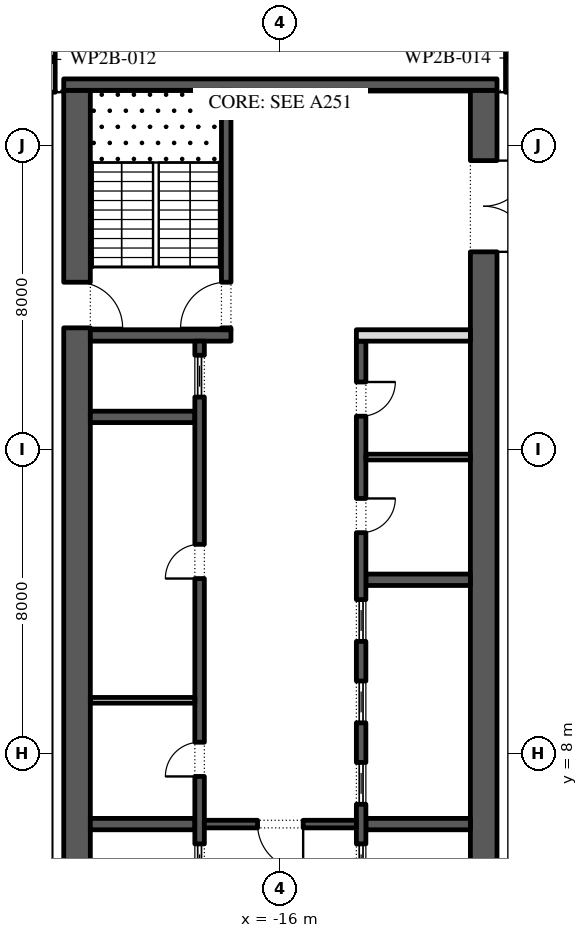
"""IFC4 building model, lengths in metres.
Left out: names, types, materials, properties, quantities, classifications, styles, units other than length and angle.
Written with IfcOpenShell. Run it as: python <this file> out.ifc"""

import sys

from ifc_helpers import new_model, si_unit, direction, frame, frame_2d, origin, place, context, subcontext, project, spatial, rectangle, extrude, element, fill, save


model = new_model("IFC4")
c1 = context("Model", 3, precision=1e-05, world=origin(), true_north=direction((0.0, 1.0)))
c2 = subcontext(c1, "Body", "Model", "MODEL_VIEW")
j1 = project(units=[si_unit("LENGTHUNIT", "METRE"), si_unit("PLANEANGLEUNIT", "RADIAN")], contexts=[c1])
p1 = place(None, origin())
s1 = spatial("IfcSite", under=j1, at=p1, CompositionType="ELEMENT")
p2 = place(p1, origin())
s2 = spatial("IfcBuilding", under=s1, at=p2, CompositionType="ELEMENT")
p3 = place(p2, frame((0.0, 0.0, 217.8)))
s3 = spatial("IfcBuildingStorey", under=s2, at=p3, CompositionType="ELEMENT", Elevation=217.8)
p4 = place(p3, frame((-33.157, 30.092, 0.0), z_axis=(0.0, 0.0, 1.0), x_axis=(0.224950279389, -0.974370243697, 0.0)))
e1 = element("IfcWall", 1, at=p4, inside=s3, PredefinedType="STANDARD", context=c2, shape_type="SweptSolid", body=[
    extrude(rectangle(XDim=49.5, YDim=0.3, at=frame_2d((24.75, 0.0))), origin(), (0.0, 0.0, 1.0), 3.95),
])
p5 = place(p4, frame((2.207, 0.0, 0.0)))
e2 = element("IfcOpeningElement", 2, at=p5, cuts=e1, PredefinedType="OPENING", context=c2, shape_type="SweptSolid", body=[
    extrude(rectangle(XDim=2.4, YDim=3.5, at=frame_2d((1.2, 1.75))), frame((0.0, 0.16, 0.0), z_axis=(0.0, -1.0, 0.0), x_axis=(1.0, 0.0, 0.0)), (0.0, 0.0, 1.0), 0.32),
])
p6 = place(p4, frame((8.121, 0.0, 0.45)))
e3 = element("IfcOpeningElement", 3, at=p6, cuts=e1, PredefinedType="OPENING", context=c2, shape_type="SweptSolid", body=[
    extrude(rectangle(XDim=4.5, YDim=2.775, at=frame_2d((2.25, 1.387))), frame((0.0, 0.16, 0.0), z_axis=(0.0, -1.0, 0.0), x_axis=(1.0, 0.0, 0.0)), (0.0, 0.0, 1.0), 0.32),
])
p7 = place(p4, frame((15.236, 0.0, 0.45)))
e4 = element("IfcOpeningElement", 4, at=p7, cuts=e1, PredefinedType="OPENING", context=c2, shape_type="SweptSolid", body=[
    extrude(rectangle(XDim=4.5, YDim=2.9, at=frame_2d((2.25, 1.45))), frame((0.0, 0.16, 0.0), z_axis=(0.0, -1.0, 0.0), x_axis=(1.0, 0.0, 0.0)), (0.0, 0.0, 1.0), 0.32),
])
p8 = place(p4, frame((22.35, 0.0, 0.45)))
e5 = element("IfcOpeningElement", 5, at=p8, cuts=e1, PredefinedType="OPENING", context=c2, shape_type="SweptSolid", body=[
    extrude(rectangle(XDim=4.5, YDim=2.95, at=frame_2d((2.25, 1.475))), frame((0.0, 0.16, 0.0), z_axis=(0.0, -1.0, 0.0), x_axis=(1.0, 0.0, 0.0)), (0.0, 0.0, 1.0), 0.32),
])
p9 = place(p4, frame((30.514, 0.0, 0.0)))
e6 = element("IfcOpeningElement", 6, at=p9, cuts=e1, PredefinedType="OPENING", context=c2, shape_type="SweptSolid", body=[
    extrude(rectangle(XDim=2.4, YDim=3.5, at=frame_2d((1.2, 1.75))), frame((0.0, 0.16, 0.0), z_axis=(0.0, -1.0, 0.0), x_axis=(1.0, 0.0, 0.0)), (0.0, 0.0, 1.0), 0.32),
])
p10 = place(p4, frame((36.579, 0.0, 0.45)))
e7 = element("IfcOpeningElement", 7, at=p10, cuts=e1, PredefinedType="OPENING", context=c2, shape_type="SweptSolid", body=[
    extrude(rectangle(XDim=4.5, YDim=3.05, at=frame_2d((2.25, 1.525))), frame((0.0, 0.16, 0.0), z_axis=(0.0, -1.0, 0.0), x_axis=(1.0, 0.0, 0.0)), (0.0, 0.0, 1.0), 0.32),
])
p11 = place(p4, frame((43.693, 0.0, 0.45)))
e8 = element("IfcOpeningElement", 8, at=p11, cuts=e1, PredefinedType="OPENING", context=c2, shape_type="SweptSolid", body=[
    extrude(rectangle(XDim=4.5, YDim=3.05, at=frame_2d((2.25, 1.525))), frame((0.0, 0.16, 0.0), z_axis=(0.0, -1.0, 0.0), x_axis=(1.0, 0.0, 0.0)), (0.0, 0.0, 1.0), 0.32),
])
p12 = place(p3, frame((-21.35, -2.45, 0.0), z_axis=(0.0, 0.0, 1.0), x_axis=(0.0, 1.0, 0.0)))
e9 = element("IfcWall", 9, at=p12, inside=s3, PredefinedType="SHEAR", context=c2, shape_type="SweptSolid", body=[
    extrude(rectangle(XDim=27.9, YDim=0.7, at=frame_2d((13.95, 0.0))), origin(), (0.0, 0.0, 1.0), 3.95),
])
p13 = place(p12, frame((5.05, 0.0, 0.0)))
e10 = element("IfcOpeningElement", 10, at=p13, cuts=e9, PredefinedType="OPENING", context=c2, shape_type="SweptSolid", body=[
    extrude(rectangle(XDim=1.2, YDim=2.1, at=frame_2d((0.6, 1.05))), frame((0.0, 0.36, 0.0), z_axis=(0.0, -1.0, 0.0), x_axis=(1.0, 0.0, 0.0)), (0.0, 0.0, 1.0), 0.72),
])
p14 = place(p12, frame((21.65, 0.0, 0.0)))
e11 = element("IfcOpeningElement", 11, at=p14, cuts=e9, PredefinedType="OPENING", context=c2, shape_type="SweptSolid", body=[
    extrude(rectangle(XDim=1.2, YDim=2.1, at=frame_2d((0.6, 1.05))), frame((0.0, 0.36, 0.0), z_axis=(0.0, -1.0, 0.0), x_axis=(1.0, 0.0, 0.0)), (0.0, 0.0, 1.0), 0.72),
])
p15 = place(p3, frame((-10.65, -2.45, 0.0), z_axis=(0.0, 0.0, 1.0), x_axis=(0.0, 1.0, 0.0)))
e12 = element("IfcWall", 12, at=p15, inside=s3, PredefinedType="SHEAR", context=c2, shape_type="SweptSolid", body=[
    extrude(rectangle(XDim=27.9, YDim=0.7, at=frame_2d((13.95, 0.0))), origin(), (0.0, 0.0, 1.0), 3.95),
])
p16 = place(p15, frame((23.65, 0.0, 0.0)))
e13 = element("IfcOpeningElement", 13, at=p16, cuts=e12, PredefinedType="OPENING", context=c2, shape_type="SweptSolid", body=[
    extrude(rectangle(XDim=2.4, YDim=2.1, at=frame_2d((1.2, 1.05))), frame((0.0, 0.36, 0.0), z_axis=(0.0, -1.0, 0.0), x_axis=(1.0, 0.0, 0.0)), (0.0, 0.0, 1.0), 0.72),
])
p17 = place(p15, frame((1.087, 0.0, 0.0)))
e14 = element("IfcOpeningElement", 14, at=p17, cuts=e12, PredefinedType="OPENING", context=c2, shape_type="SweptSolid", body=[
    extrude(rectangle(XDim=0.9, YDim=2.1, at=frame_2d((0.45, 1.05))), frame((0.0, 0.36, 0.0), z_axis=(0.0, -1.0, 0.0), x_axis=(1.0, 0.0, 0.0)), (0.0, 0.0, 1.0), 0.72),
])
p18 = place(p15, frame((4.262, 0.0, 0.0)))
e15 = element("IfcOpeningElement", 15, at=p18, cuts=e12, PredefinedType="OPENING", context=c2, shape_type="SweptSolid", body=[
    extrude(rectangle(XDim=1.0, YDim=2.1, at=frame_2d((0.5, 1.05))), frame((0.0, 0.36, 0.0), z_axis=(0.0, -1.0, 0.0), x_axis=(1.0, 0.0, 0.0)), (0.0, 0.0, 1.0), 0.72),
])
p19 = place(p3, frame((-21.7, 25.6, 0.0), z_axis=(0.0, 0.0, 1.0), x_axis=(1.0, 0.0, 0.0)))
e16 = element("IfcWall", 16, at=p19, inside=s3, PredefinedType="SHEAR", context=c2, shape_type="SweptSolid", body=[
    extrude(rectangle(XDim=11.4, YDim=0.3, at=frame_2d((5.7, 0.0))), origin(), (0.0, 0.0, 1.0), 3.95),
])
p20 = place(p3, frame((-21.0, 19.0, 0.0), z_axis=(0.0, 0.0, 1.0), x_axis=(1.0, 0.0, 0.0)))
e17 = element("IfcWall", 17, at=p20, inside=s3, PredefinedType="SHEAR", context=c2, shape_type="SweptSolid", body=[
    extrude(rectangle(XDim=3.7, YDim=0.3, at=frame_2d((1.85, 0.0))), origin(), (0.0, 0.0, 1.0), 3.95),
])
p21 = place(p3, frame((-17.425, 19.15, 0.0), z_axis=(0.0, 0.0, 1.0), x_axis=(0.0, 1.0, 0.0)))
e18 = element("IfcWall", 18, at=p21, inside=s3, PredefinedType="SHEAR", context=c2, shape_type="SweptSolid", body=[
    extrude(rectangle(XDim=6.3, YDim=0.25, at=frame_2d((3.15, 0.0))), origin(), (0.0, 0.0, 1.0), 3.95),
])
p22 = place(p21, frame((0.05, 0.0, 0.0)))
e19 = element("IfcOpeningElement", 19, at=p22, cuts=e18, PredefinedType="OPENING", context=c2, shape_type="SweptSolid", body=[
    extrude(rectangle(XDim=1.2, YDim=2.1, at=frame_2d((0.6, 1.05))), frame((0.0, 0.135, 0.0), z_axis=(0.0, -1.0, 0.0), x_axis=(1.0, 0.0, 0.0)), (0.0, 0.0, 1.0), 0.27),
])
for number, where, z_axis, x_axis in (
    (20, (-21.0, 6.143, 0.0), (0.0, 0.0, 1.0), (1.0, 0.0, 0.0)),
    (21, (-21.0, 16.857, 0.0), (0.0, 0.0, 1.0), (1.0, 0.0, 0.0)),
):
    element("IfcWall", number, at=place(p3, frame(where, z_axis=z_axis, x_axis=x_axis)), inside=s3, PredefinedType="SHEAR", context=c2, shape_type="SweptSolid", body=[
        extrude(rectangle(XDim=2.75, YDim=0.3, at=frame_2d((1.375, 0.0))), origin(), (0.0, 0.0, 1.0), 3.95),
    ])
p23 = place(p3, frame((-18.125, 4.15, 0.0), z_axis=(0.0, 0.0, 1.0), x_axis=(0.0, 1.0, 0.0)))
e22 = element("IfcWall", 22, at=p23, inside=s3, PredefinedType="SHEAR", context=c2, shape_type="SweptSolid", body=[
    extrude(rectangle(XDim=14.7, YDim=0.25, at=frame_2d((7.35, 0.0))), origin(), (0.0, 0.0, 1.0), 3.95),
])
p24 = place(p23, frame((3.246, 0.0, 0.0)))
e23 = element("IfcOpeningElement", 23, at=p24, cuts=e22, PredefinedType="OPENING", context=c2, shape_type="SweptSolid", body=[
    extrude(rectangle(XDim=0.9, YDim=2.1, at=frame_2d((0.45, 1.05))), frame((0.0, 0.135, 0.0), z_axis=(0.0, -1.0, 0.0), x_axis=(1.0, 0.0, 0.0)), (0.0, 0.0, 1.0), 0.27),
])
p25 = place(p23, frame((8.454, 0.0, 0.0)))
e24 = element("IfcOpeningElement", 24, at=p25, cuts=e22, PredefinedType="OPENING", context=c2, shape_type="SweptSolid", body=[
    extrude(rectangle(XDim=0.9, YDim=2.1, at=frame_2d((0.45, 1.05))), frame((0.0, 0.135, 0.0), z_axis=(0.0, -1.0, 0.0), x_axis=(1.0, 0.0, 0.0)), (0.0, 0.0, 1.0), 0.27),
])
p26 = place(p23, frame((0.371, 0.0, 0.0)))
e25 = element("IfcOpeningElement", 25, at=p26, cuts=e22, PredefinedType="OPENING", context=c2, shape_type="SweptSolid", body=[
    extrude(rectangle(XDim=1.1, YDim=2.1, at=frame_2d((0.55, 1.05))), frame((0.0, 0.135, 0.0), z_axis=(0.0, -1.0, 0.0), x_axis=(1.0, 0.0, 0.0)), (0.0, 0.0, 1.0), 0.27),
])
p27 = place(p23, frame((13.229, 0.0, 0.0)))
e26 = element("IfcOpeningElement", 26, at=p27, cuts=e22, PredefinedType="OPENING", context=c2, shape_type="SweptSolid", body=[
    extrude(rectangle(XDim=1.1, YDim=2.1, at=frame_2d((0.55, 1.05))), frame((0.0, 0.135, 0.0), z_axis=(0.0, -1.0, 0.0), x_axis=(1.0, 0.0, 0.0)), (0.0, 0.0, 1.0), 0.27),
])
p28 = place(p3, frame((-21.0, 9.4, 0.0), z_axis=(0.0, 0.0, 1.0), x_axis=(1.0, 0.0, 0.0)))
e27 = element("IfcWall", 27, at=p28, inside=s3, PredefinedType="PARTITIONING", context=c2, shape_type="SweptSolid", body=[
    extrude(rectangle(XDim=2.75, YDim=0.15, at=frame_2d((1.375, 0.0))), origin(), (0.0, 0.0, 1.0), 3.95),
])
for number, where, z_axis, x_axis in (
    (28, (-13.75, 6.143, 0.0), (0.0, 0.0, 1.0), (1.0, 0.0, 0.0)),
    (29, (-13.75, 12.571, 0.0), (0.0, 0.0, 1.0), (1.0, 0.0, 0.0)),
):
    element("IfcWall", number, at=place(p3, frame(where, z_axis=z_axis, x_axis=x_axis)), inside=s3, PredefinedType="SHEAR", context=c2, shape_type="SweptSolid", body=[
        extrude(rectangle(XDim=2.75, YDim=0.3, at=frame_2d((1.375, 0.0))), origin(), (0.0, 0.0, 1.0), 3.95),
    ])
p29 = place(p3, frame((-13.875, -2.45, 0.0), z_axis=(0.0, 0.0, 1.0), x_axis=(0.0, 1.0, 0.0)))
e30 = element("IfcWall", 30, at=p29, inside=s3, PredefinedType="SHEAR", context=c2, shape_type="SweptSolid", body=[
    extrude(rectangle(XDim=21.3, YDim=0.25, at=frame_2d((10.65, 0.0))), origin(), (0.0, 0.0, 1.0), 3.95),
])
p30 = place(p29, frame((16.261, 0.0, 0.0)))
e31 = element("IfcOpeningElement", 31, at=p30, cuts=e30, PredefinedType="OPENING", context=c2, shape_type="SweptSolid", body=[
    extrude(rectangle(XDim=0.9, YDim=2.1, at=frame_2d((0.45, 1.05))), frame((0.0, 0.135, 0.0), z_axis=(0.0, -1.0, 0.0), x_axis=(1.0, 0.0, 0.0)), (0.0, 0.0, 1.0), 0.27),
])
p31 = place(p29, frame((19.325, 0.0, 0.0)))
e32 = element("IfcOpeningElement", 32, at=p31, cuts=e30, PredefinedType="OPENING", context=c2, shape_type="SweptSolid", body=[
    extrude(rectangle(XDim=0.9, YDim=2.1, at=frame_2d((0.45, 1.05))), frame((0.0, 0.135, 0.0), z_axis=(0.0, -1.0, 0.0), x_axis=(1.0, 0.0, 0.0)), (0.0, 0.0, 1.0), 0.27),
])
p32 = place(p29, frame((6.971, 0.0, 0.0)))
e33 = element("IfcOpeningElement", 33, at=p32, cuts=e30, PredefinedType="OPENING", context=c2, shape_type="SweptSolid", body=[
    extrude(rectangle(XDim=1.1, YDim=2.1, at=frame_2d((0.55, 1.05))), frame((0.0, 0.135, 0.0), z_axis=(0.0, -1.0, 0.0), x_axis=(1.0, 0.0, 0.0)), (0.0, 0.0, 1.0), 0.27),
])
p33 = place(p29, frame((9.114, 0.0, 0.0)))
e34 = element("IfcOpeningElement", 34, at=p33, cuts=e30, PredefinedType="OPENING", context=c2, shape_type="SweptSolid", body=[
    extrude(rectangle(XDim=1.1, YDim=2.1, at=frame_2d((0.55, 1.05))), frame((0.0, 0.135, 0.0), z_axis=(0.0, -1.0, 0.0), x_axis=(1.0, 0.0, 0.0)), (0.0, 0.0, 1.0), 0.27),
])
p34 = place(p29, frame((11.257, 0.0, 0.0)))
e35 = element("IfcOpeningElement", 35, at=p34, cuts=e30, PredefinedType="OPENING", context=c2, shape_type="SweptSolid", body=[
    extrude(rectangle(XDim=1.1, YDim=2.1, at=frame_2d((0.55, 1.05))), frame((0.0, 0.135, 0.0), z_axis=(0.0, -1.0, 0.0), x_axis=(1.0, 0.0, 0.0)), (0.0, 0.0, 1.0), 0.27),
])
p35 = place(p29, frame((13.4, 0.0, 0.0)))
e36 = element("IfcOpeningElement", 36, at=p35, cuts=e30, PredefinedType="OPENING", context=c2, shape_type="SweptSolid", body=[
    extrude(rectangle(XDim=1.1, YDim=2.1, at=frame_2d((0.55, 1.05))), frame((0.0, 0.135, 0.0), z_axis=(0.0, -1.0, 0.0), x_axis=(1.0, 0.0, 0.0)), (0.0, 0.0, 1.0), 0.27),
])
p36 = place(p3, frame((-14.0, 19.0, 0.0), z_axis=(0.0, 0.0, 1.0), x_axis=(1.0, 0.0, 0.0)))
e37 = element("IfcWall", 37, at=p36, inside=s3, PredefinedType="PARTITIONING", context=c2, shape_type="SweptSolid", body=[
    extrude(rectangle(XDim=3.0, YDim=0.3, at=frame_2d((1.5, 0.0))), origin(), (0.0, 0.0, 1.0), 3.95),
])
p37 = place(p3, frame((-13.75, 15.8, 0.0), z_axis=(0.0, 0.0, 1.0), x_axis=(1.0, 0.0, 0.0)))
e38 = element("IfcWall", 38, at=p37, inside=s3, PredefinedType="PARTITIONING", context=c2, shape_type="SweptSolid", body=[
    extrude(rectangle(XDim=2.75, YDim=0.15, at=frame_2d((1.375, 0.0))), origin(), (0.0, 0.0, 1.0), 3.95),
])
p38 = place(p3, frame((-18.0, 6.143, 0.0), z_axis=(0.0, 0.0, 1.0), x_axis=(1.0, 0.0, 0.0)))
e39 = element("IfcWall", 39, at=p38, inside=s3, PredefinedType="SHEAR", context=c2, shape_type="SweptSolid", body=[
    extrude(rectangle(XDim=4.0, YDim=0.2, at=frame_2d((2.0, 0.0))), origin(), (0.0, 0.0, 1.0), 3.95),
])
p39 = place(p38, frame((1.4, 0.0, 0.0)))
e40 = element("IfcOpeningElement", 40, at=p39, cuts=e39, PredefinedType="OPENING", context=c2, shape_type="SweptSolid", body=[
    extrude(rectangle(XDim=1.2, YDim=2.1, at=frame_2d((0.6, 1.05))), frame((0.0, 0.11, 0.0), z_axis=(0.0, -1.0, 0.0), x_axis=(1.0, 0.0, 0.0)), (0.0, 0.0, 1.0), 0.22),
])
p40 = place(p3, frame((-22.0, 27.125, 0.0), z_axis=(0.0, 0.0, 1.0), x_axis=(0.0, -1.0, 0.0)))
e41 = element("IfcWall", 41, at=p40, inside=s3, PredefinedType="PARTITIONING", context=c2, shape_type="SweptSolid", body=[
    extrude(rectangle(XDim=1.725, YDim=0.15, at=frame_2d((0.863, 0.0))), origin(), (0.0, 0.0, 1.0), 3.95),
])
p41 = place(p3, frame((-10.0, 25.4, 0.0), z_axis=(0.0, 0.0, 1.0), x_axis=(0.0, 1.0, 0.0)))
e42 = element("IfcWall", 42, at=p41, inside=s3, PredefinedType="PARTITIONING", context=c2, shape_type="SweptSolid", body=[
    extrude(rectangle(XDim=1.8, YDim=0.15, at=frame_2d((0.9, 0.0))), origin(), (0.0, 0.0, 1.0), 3.95),
])
p42 = place(p24, origin())
e43 = element("IfcDoor", 43, at=p42, inside=s3, OperationType="SINGLE_SWING_RIGHT", PredefinedType="DOOR", context=c2, shape_type="SweptSolid", body=[
    extrude(rectangle(XDim=0.9, YDim=2.1, at=frame_2d((0.45, 1.05))), frame((0.0, 0.125, 0.0), z_axis=(0.0, -1.0, 0.0), x_axis=(1.0, 0.0, 0.0)), (0.0, 0.0, 1.0), 0.05),
])
fill(e23, e43)
p43 = place(p25, origin())
e44 = element("IfcDoor", 44, at=p43, inside=s3, OperationType="SINGLE_SWING_RIGHT", PredefinedType="DOOR", context=c2, shape_type="SweptSolid", body=[
    extrude(rectangle(XDim=0.9, YDim=2.1, at=frame_2d((0.45, 1.05))), frame((0.0, 0.125, 0.0), z_axis=(0.0, -1.0, 0.0), x_axis=(1.0, 0.0, 0.0)), (0.0, 0.0, 1.0), 0.05),
])
fill(e24, e44)
p44 = place(p26, origin())
e45 = element("IfcDoor", 45, at=p44, inside=s3, OperationType="SLIDING_TO_LEFT", PredefinedType="DOOR", context=c2, shape_type="SweptSolid", body=[
    extrude(rectangle(XDim=1.1, YDim=2.1, at=frame_2d((0.55, 1.05))), frame((0.0, 0.025, 0.0), z_axis=(0.0, -1.0, 0.0), x_axis=(1.0, 0.0, 0.0)), (0.0, 0.0, 1.0), 0.05),
])
fill(e25, e45)
p45 = place(p27, origin())
e46 = element("IfcDoor", 46, at=p45, inside=s3, OperationType="SLIDING_TO_LEFT", PredefinedType="DOOR", context=c2, shape_type="SweptSolid", body=[
    extrude(rectangle(XDim=1.1, YDim=2.1, at=frame_2d((0.55, 1.05))), frame((0.0, 0.025, 0.0), z_axis=(0.0, -1.0, 0.0), x_axis=(1.0, 0.0, 0.0)), (0.0, 0.0, 1.0), 0.05),
])
fill(e26, e46)
p46 = place(p30, frame((0.9, -0.2, 0.0), z_axis=(0.0, 0.0, 1.0), x_axis=(-1.0, 0.0, 0.0)))
e47 = element("IfcDoor", 47, at=p46, inside=s3, OperationType="SINGLE_SWING_RIGHT", PredefinedType="DOOR", context=c2, shape_type="SweptSolid", body=[
    extrude(rectangle(XDim=0.9, YDim=2.1, at=frame_2d((0.45, 1.05))), frame((0.0, -0.075, 0.0), z_axis=(0.0, -1.0, 0.0), x_axis=(1.0, 0.0, 0.0)), (0.0, 0.0, 1.0), 0.05),
])
fill(e31, e47)
p47 = place(p31, frame((0.9, -0.2, 0.0), z_axis=(0.0, 0.0, 1.0), x_axis=(-1.0, 0.0, 0.0)))
e48 = element("IfcDoor", 48, at=p47, inside=s3, OperationType="SINGLE_SWING_RIGHT", PredefinedType="DOOR", context=c2, shape_type="SweptSolid", body=[
    extrude(rectangle(XDim=0.9, YDim=2.1, at=frame_2d((0.45, 1.05))), frame((0.0, -0.075, 0.0), z_axis=(0.0, -1.0, 0.0), x_axis=(1.0, 0.0, 0.0)), (0.0, 0.0, 1.0), 0.05),
])
fill(e32, e48)
p48 = place(p32, origin())
e49 = element("IfcDoor", 49, at=p48, inside=s3, OperationType="SLIDING_TO_LEFT", PredefinedType="DOOR", context=c2, shape_type="SweptSolid", body=[
    extrude(rectangle(XDim=1.1, YDim=2.1, at=frame_2d((0.55, 1.05))), frame((0.0, 0.025, 0.0), z_axis=(0.0, -1.0, 0.0), x_axis=(1.0, 0.0, 0.0)), (0.0, 0.0, 1.0), 0.05),
])
fill(e33, e49)
p49 = place(p33, origin())
e50 = element("IfcDoor", 50, at=p49, inside=s3, OperationType="SLIDING_TO_LEFT", PredefinedType="DOOR", context=c2, shape_type="SweptSolid", body=[
    extrude(rectangle(XDim=1.1, YDim=2.1, at=frame_2d((0.55, 1.05))), frame((0.0, 0.025, 0.0), z_axis=(0.0, -1.0, 0.0), x_axis=(1.0, 0.0, 0.0)), (0.0, 0.0, 1.0), 0.05),
])
fill(e34, e50)
p50 = place(p34, origin())
e51 = element("IfcDoor", 51, at=p50, inside=s3, OperationType="SLIDING_TO_LEFT", PredefinedType="DOOR", context=c2, shape_type="SweptSolid", body=[
    extrude(rectangle(XDim=1.1, YDim=2.1, at=frame_2d((0.55, 1.05))), frame((0.0, 0.025, 0.0), z_axis=(0.0, -1.0, 0.0), x_axis=(1.0, 0.0, 0.0)), (0.0, 0.0, 1.0), 0.05),
])
fill(e35, e51)
p51 = place(p35, origin())
e52 = element("IfcDoor", 52, at=p51, inside=s3, OperationType="SLIDING_TO_LEFT", PredefinedType="DOOR", context=c2, shape_type="SweptSolid", body=[
    extrude(rectangle(XDim=1.1, YDim=2.1, at=frame_2d((0.55, 1.05))), frame((0.0, 0.025, 0.0), z_axis=(0.0, -1.0, 0.0), x_axis=(1.0, 0.0, 0.0)), (0.0, 0.0, 1.0), 0.05),
])
fill(e36, e52)
p52 = place(p39, frame((1.2, 0.0, 0.0), z_axis=(0.0, 0.0, 1.0), x_axis=(-1.0, 0.0, 0.0)))
e53 = element("IfcDoor", 53, at=p52, inside=s3, OperationType="SINGLE_SWING_RIGHT", PredefinedType="DOOR", context=c2, shape_type="SweptSolid", body=[
    extrude(rectangle(XDim=1.2, YDim=2.1, at=frame_2d((0.6, 1.05))), frame((0.0, 0.025, 0.0), z_axis=(0.0, -1.0, 0.0), x_axis=(1.0, 0.0, 0.0)), (0.0, 0.0, 1.0), 0.05),
])
fill(e40, e53)
p53 = place(p16, frame((2.4, 0.0, 0.0), z_axis=(0.0, 0.0, 1.0), x_axis=(-1.0, 0.0, 0.0)))
e54 = element("IfcDoor", 54, at=p53, inside=s3, OperationType="DOUBLE_DOOR_SINGLE_SWING", PredefinedType="DOOR", context=c2, shape_type="SweptSolid", body=[
    extrude(rectangle(XDim=2.4, YDim=2.1, at=frame_2d((1.2, 1.05))), frame((0.0, 0.025, 0.0), z_axis=(0.0, -1.0, 0.0), x_axis=(1.0, 0.0, 0.0)), (0.0, 0.0, 1.0), 0.05),
])
fill(e13, e54)
p54 = place(p22, origin())
e55 = element("IfcDoor", 55, at=p54, inside=s3, OperationType="SINGLE_SWING_RIGHT", PredefinedType="DOOR", context=c2, shape_type="SweptSolid", body=[
    extrude(rectangle(XDim=1.2, YDim=2.1, at=frame_2d((0.6, 1.05))), frame((0.0, 0.025, 0.0), z_axis=(0.0, -1.0, 0.0), x_axis=(1.0, 0.0, 0.0)), (0.0, 0.0, 1.0), 0.05),
])
fill(e19, e55)
p55 = place(p14, frame((1.2, 0.0, 0.0), z_axis=(0.0, 0.0, 1.0), x_axis=(-1.0, 0.0, 0.0)))
e56 = element("IfcDoor", 56, at=p55, inside=s3, OperationType="SINGLE_SWING_LEFT", PredefinedType="DOOR", context=c2, shape_type="SweptSolid", body=[
    extrude(rectangle(XDim=1.2, YDim=2.1, at=frame_2d((0.6, 1.05))), frame((0.0, 0.025, 0.0), z_axis=(0.0, -1.0, 0.0), x_axis=(1.0, 0.0, 0.0)), (0.0, 0.0, 1.0), 0.05),
])
fill(e11, e56)
save(model, sys.argv[1])
